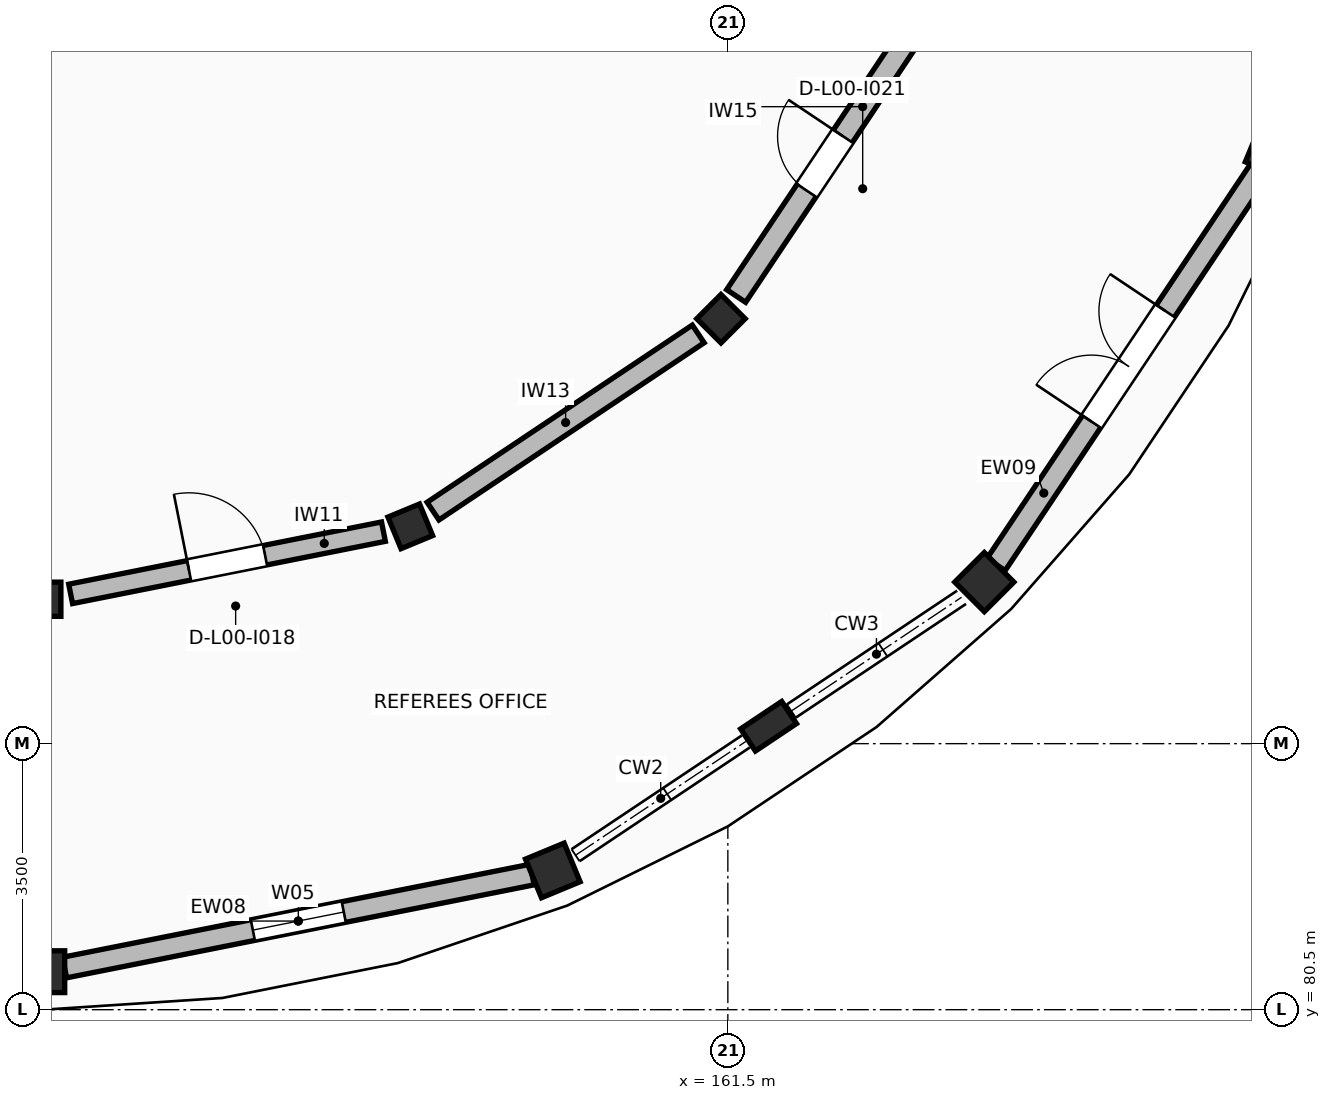
"""IFC4 building model, lengths in metres.
Left out: names, types, materials, properties, quantities, classifications, styles, units other than length and angle.
Written with IfcOpenShell. Run it as: python <this file> out.ifc"""

import sys

from ifc_helpers import new_model, si_unit, direction, frame, frame_2d, origin, origin_2d, place, context, subcontext, project, spatial, rectangle, extrude, element, fill, save


model = new_model("IFC4")
c1 = context("Model", 3, precision=1e-05, world=origin(), true_north=direction((0.0, 1.0)))
c2 = subcontext(c1, "Body", "Model", "MODEL_VIEW")
j1 = project(units=[si_unit("LENGTHUNIT", "METRE"), si_unit("PLANEANGLEUNIT", "RADIAN")], contexts=[c1])
p1 = place(None, origin())
s1 = spatial("IfcSite", under=j1, at=p1, CompositionType="ELEMENT")
p2 = place(p1, origin())
s2 = spatial("IfcBuilding", under=s1, at=p2, CompositionType="ELEMENT")
p3 = place(p2, origin())
s3 = spatial("IfcBuildingStorey", under=s2, at=p3, CompositionType="ELEMENT", Elevation=0.0)
p4 = place(p3, frame((152.5, 85.9, 0.0), z_axis=(0.0, 0.0, 1.0), x_axis=(0.0, -1.0, 0.0)))
e1 = element("IfcColumn", 1, at=p4, inside=s3, PredefinedType="COLUMN", context=c2, shape_type="SweptSolid", body=[
    extrude(rectangle(XDim=0.45, YDim=0.45, at=origin_2d()), origin(), (0.0, 0.0, 1.0), 4.42),
])
p5 = place(p3, frame((152.5, 81.0, 0.0), z_axis=(0.0, 0.0, 1.0), x_axis=(0.0, -1.0, 0.0)))
e2 = element("IfcColumn", 2, at=p5, inside=s3, PredefinedType="COLUMN", context=c2, shape_type="SweptSolid", body=[
    extrude(rectangle(XDim=0.55, YDim=0.55, at=origin_2d()), origin(), (0.0, 0.0, 1.0), 4.42),
])
p6 = place(p3, frame((157.322, 86.859, 0.0), z_axis=(0.0, 0.0, 1.0), x_axis=(0.382683432365, -0.923879532511, 0.0)))
e3 = element("IfcColumn", 3, at=p6, inside=s3, PredefinedType="COLUMN", context=c2, shape_type="SweptSolid", body=[
    extrude(rectangle(XDim=0.45, YDim=0.45, at=origin_2d()), origin(), (0.0, 0.0, 1.0), 4.42),
])
p7 = place(p3, frame((159.197, 82.332, 0.0), z_axis=(0.0, 0.0, 1.0), x_axis=(0.382683432365, -0.923879532511, 0.0)))
e4 = element("IfcColumn", 4, at=p7, inside=s3, PredefinedType="COLUMN", context=c2, shape_type="SweptSolid", body=[
    extrude(rectangle(XDim=0.55, YDim=0.55, at=origin_2d()), origin(), (0.0, 0.0, 1.0), 4.42),
])
p8 = place(p3, frame((161.409, 89.591, 0.0), z_axis=(0.0, 0.0, 1.0), x_axis=(0.707106781187, -0.707106781187, 0.0)))
e5 = element("IfcColumn", 5, at=p8, inside=s3, PredefinedType="COLUMN", context=c2, shape_type="SweptSolid", body=[
    extrude(rectangle(XDim=0.45, YDim=0.45, at=origin_2d()), origin(), (0.0, 0.0, 1.0), 4.42),
])
for number, where, z_axis, x_axis in (
    (6, (164.874, 86.126, 0.0), (0.0, 0.0, 1.0), (0.707, -0.707, 0.0)),
    (7, (168.668, 91.803, 0.0), (0.0, 0.0, 1.0), (0.924, -0.383, 0.0)),
):
    element("IfcColumn", number, at=place(p3, frame(where, z_axis=z_axis, x_axis=x_axis)), inside=s3, PredefinedType="COLUMN", context=c2, shape_type="SweptSolid", body=[
        extrude(rectangle(XDim=0.55, YDim=0.55, at=origin_2d()), origin(), (0.0, 0.0, 1.0), 4.42),
    ])
p9 = place(p3, frame((162.036, 84.229, 0.0), z_axis=(0.0, 0.0, 1.0), x_axis=(0.55557023302, -0.831469612303, 0.0)))
e8 = element("IfcColumn", 8, at=p9, inside=s3, PredefinedType="PILASTER", context=c2, shape_type="SweptSolid", body=[
    extrude(rectangle(XDim=0.35, YDim=0.65, at=origin_2d()), origin(), (0.0, 0.0, 1.0), 4.42),
])
p10 = place(p3, frame((152.773, 81.054, 0.0), z_axis=(0.0, 0.0, 1.0), x_axis=(0.980785242574, 0.195090512195, 0.0)))
e9 = element("IfcWall", 9, at=p10, inside=s3, PredefinedType="STANDARD", context=c2, shape_type="SweptSolid", body=[
    extrude(rectangle(XDim=6.272, YDim=0.276, at=frame_2d((3.136, 0.0))), origin(), (0.0, 0.0, 1.0), 3.4),
])
p11 = place(p10, frame((2.526, 0.0, 0.95)))
e10 = element("IfcOpeningElement", 10, at=p11, cuts=e9, PredefinedType="OPENING", context=c2, shape_type="SweptSolid", body=[
    extrude(rectangle(XDim=1.22, YDim=1.15, at=frame_2d((0.61, 0.575))), frame((0.0, 0.148, 0.0), z_axis=(0.0, -1.0, 0.0), x_axis=(1.0, 0.0, 0.0)), (0.0, 0.0, 1.0), 0.296),
])
p12 = place(p3, frame((165.029, 86.357, 0.0), z_axis=(0.0, 0.0, 1.0), x_axis=(0.555571204893, 0.831468962917, 0.0)))
e11 = element("IfcWall", 11, at=p12, inside=s3, PredefinedType="STANDARD", context=c2, shape_type="SweptSolid", body=[
    extrude(rectangle(XDim=6.272, YDim=0.288, at=frame_2d((3.136, 0.0))), origin(), (0.0, 0.0, 1.0), 3.4),
])
p13 = place(p12, frame((2.261, 0.0, 0.0)))
e12 = element("IfcOpeningElement", 12, at=p13, cuts=e11, PredefinedType="OPENING", context=c2, shape_type="SweptSolid", body=[
    extrude(rectangle(XDim=1.75, YDim=2.25, at=frame_2d((0.875, 1.125))), frame((0.0, 0.154, 0.0), z_axis=(0.0, -1.0, 0.0), x_axis=(1.0, 0.0, 0.0)), (0.0, 0.0, 1.0), 0.308),
])
p14 = place(p3, frame((152.853, 85.97, 0.0), z_axis=(0.0, 0.0, 1.0), x_axis=(0.980788226851, 0.195075508639, 0.0)))
e13 = element("IfcWall", 13, at=p14, inside=s3, PredefinedType="STANDARD", context=c2, shape_type="SweptSolid", body=[
    extrude(rectangle(XDim=4.196, YDim=0.26, at=frame_2d((2.098, 0.0))), origin(), (0.0, 0.0, 1.0), 3.38),
])
p15 = place(p14, frame((1.588, 0.0, 0.0)))
e14 = element("IfcOpeningElement", 14, at=p15, cuts=e13, PredefinedType="OPENING", context=c2, shape_type="SweptSolid", body=[
    extrude(rectangle(XDim=1.02, YDim=2.18, at=frame_2d((0.51, 1.09))), frame((0.0, 0.14, 0.0), z_axis=(0.0, -1.0, 0.0), x_axis=(1.0, 0.0, 0.0)), (0.0, 0.0, 1.0), 0.28),
])
p16 = place(p3, frame((157.621, 87.059, 0.0), z_axis=(0.0, 0.0, 1.0), x_axis=(0.831468024304, 0.55557260962, 0.0)))
e15 = element("IfcWall", 15, at=p16, inside=s3, PredefinedType="STANDARD", context=c2, shape_type="SweptSolid", body=[
    extrude(rectangle(XDim=4.196, YDim=0.28, at=frame_2d((2.098, 0.0))), origin(), (0.0, 0.0, 1.0), 3.38),
])
p17 = place(p3, frame((161.61, 89.89, 0.0), z_axis=(0.0, 0.0, 1.0), x_axis=(0.55557260962, 0.831468024304, 0.0)))
e16 = element("IfcWall", 16, at=p17, inside=s3, PredefinedType="STANDARD", context=c2, shape_type="SweptSolid", body=[
    extrude(rectangle(XDim=4.196, YDim=0.3, at=frame_2d((2.098, 0.0))), origin(), (0.0, 0.0, 1.0), 3.38),
])
p18 = place(p17, frame((1.668, 0.0, 0.0)))
e17 = element("IfcOpeningElement", 17, at=p18, cuts=e16, PredefinedType="OPENING", context=c2, shape_type="SweptSolid", body=[
    extrude(rectangle(XDim=0.86, YDim=2.12, at=frame_2d((0.43, 1.06))), frame((0.0, 0.16, 0.0), z_axis=(0.0, -1.0, 0.0), x_axis=(1.0, 0.0, 0.0)), (0.0, 0.0, 1.0), 0.32),
])
p19 = place(p11, origin())
e18 = element("IfcWindow", 18, at=p19, inside=s3, PartitioningType="SINGLE_PANEL", PredefinedType="WINDOW", context=c2, shape_type="SweptSolid", body=[
    extrude(rectangle(XDim=1.22, YDim=1.15, at=frame_2d((0.61, 0.575))), frame((0.0, 0.03, 0.0), z_axis=(0.0, -1.0, 0.0), x_axis=(1.0, 0.0, 0.0)), (0.0, 0.0, 1.0), 0.06),
])
fill(e10, e18)
p20 = place(p13, frame((1.75, 0.0, 0.0), z_axis=(0.0, 0.0, 1.0), x_axis=(-1.0, 0.0, 0.0)))
e19 = element("IfcDoor", 19, at=p20, inside=s3, OperationType="DOUBLE_DOOR_SINGLE_SWING", PredefinedType="DOOR", context=c2, shape_type="SweptSolid", body=[
    extrude(rectangle(XDim=1.75, YDim=2.25, at=frame_2d((0.875, 1.125))), frame((0.0, 0.025, 0.0), z_axis=(0.0, -1.0, 0.0), x_axis=(1.0, 0.0, 0.0)), (0.0, 0.0, 1.0), 0.05),
])
fill(e12, e19)
p21 = place(p15, frame((1.02, 0.0, 0.0), z_axis=(0.0, 0.0, 1.0), x_axis=(-1.0, 0.0, 0.0)))
e20 = element("IfcDoor", 20, at=p21, inside=s3, OperationType="SINGLE_SWING_LEFT", PredefinedType="DOOR", context=c2, shape_type="SweptSolid", body=[
    extrude(rectangle(XDim=1.02, YDim=2.18, at=frame_2d((0.51, 1.09))), frame((0.0, 0.025, 0.0), z_axis=(0.0, -1.0, 0.0), x_axis=(1.0, 0.0, 0.0)), (0.0, 0.0, 1.0), 0.05),
])
fill(e14, e20)
p22 = place(p18, frame((0.86, 0.0, 0.0), z_axis=(0.0, 0.0, 1.0), x_axis=(-1.0, 0.0, 0.0)))
e21 = element("IfcDoor", 21, at=p22, inside=s3, OperationType="SINGLE_SWING_RIGHT", PredefinedType="DOOR", context=c2, shape_type="SweptSolid", body=[
    extrude(rectangle(XDim=0.86, YDim=2.12, at=frame_2d((0.43, 1.06))), frame((0.0, 0.025, 0.0), z_axis=(0.0, -1.0, 0.0), x_axis=(1.0, 0.0, 0.0)), (0.0, 0.0, 1.0), 0.05),
])
fill(e17, e21)
save(model, sys.argv[1])
